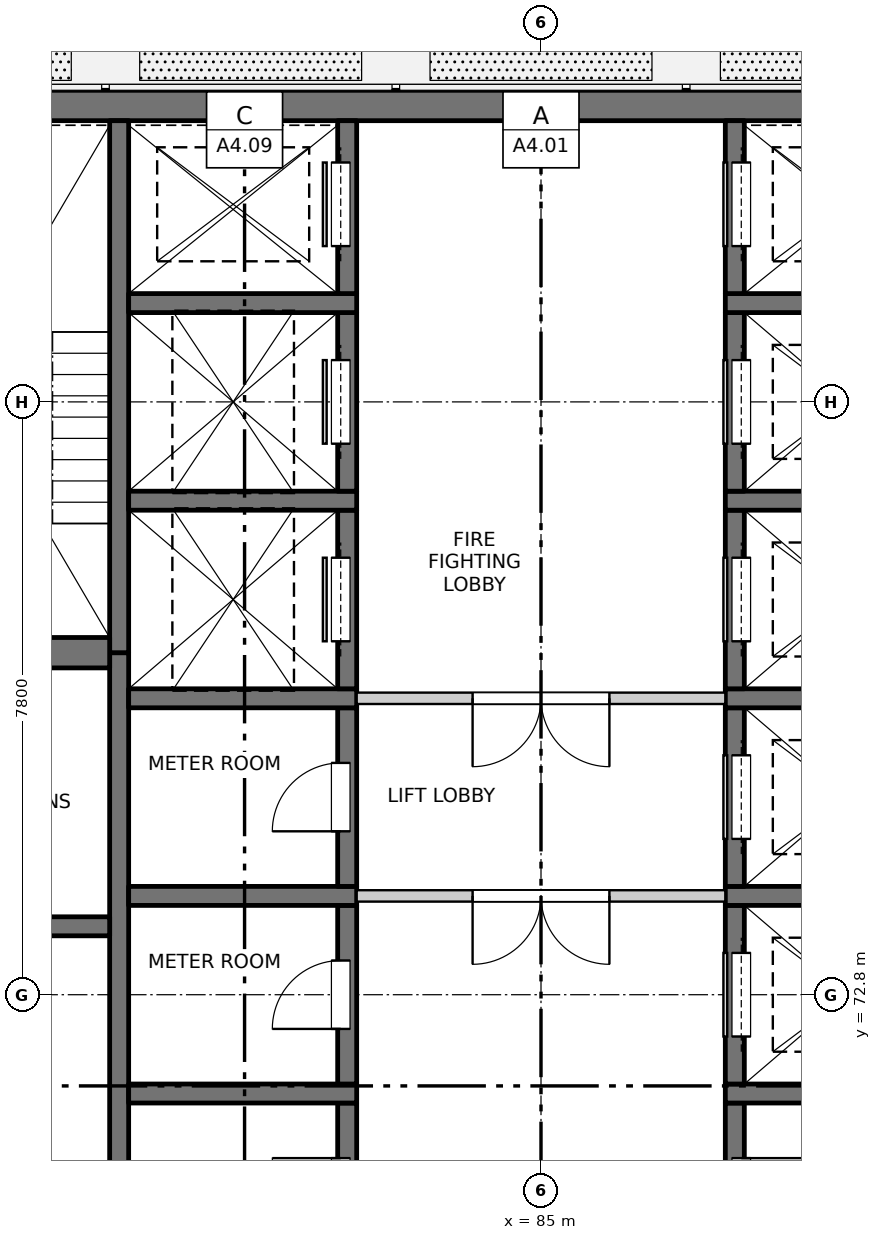
"""IFC4 building model, lengths in metres.
Left out: names, types, materials, properties, quantities, classifications, styles, units other than length and angle.
Written with IfcOpenShell. Run it as: python <this file> out.ifc"""

import sys

from ifc_helpers import new_model, si_unit, direction, frame, frame_2d, origin, place, context, subcontext, project, spatial, rectangle, extrude, element, fill, save


model = new_model("IFC4")
c1 = context("Model", 3, precision=1e-05, world=origin(), true_north=direction((0.0, 1.0)))
c2 = subcontext(c1, "Body", "Model", "MODEL_VIEW")
j1 = project(units=[si_unit("LENGTHUNIT", "METRE"), si_unit("PLANEANGLEUNIT", "RADIAN")], contexts=[c1])
p1 = place(None, origin())
s1 = spatial("IfcSite", under=j1, at=p1, CompositionType="ELEMENT")
p2 = place(p1, origin())
s2 = spatial("IfcBuilding", under=s1, at=p2, CompositionType="ELEMENT")
p3 = place(p2, frame((0.0, 0.0, 246.0)))
s3 = spatial("IfcBuildingStorey", under=s2, at=p3, CompositionType="ELEMENT", Elevation=246.0)
p4 = place(p3, frame((75.45, 84.5, -0.3), z_axis=(0.0, 0.0, 1.0), x_axis=(1.0, 0.0, 0.0)))
e1 = element("IfcWall", 1, at=p4, inside=s3, PredefinedType="SOLIDWALL", context=c2, shape_type="SweptSolid", body=[
    extrude(rectangle(XDim=19.1, YDim=0.4, at=frame_2d((9.55, 0.0))), origin(), (0.0, 0.0, 1.0), 3.45),
])
p5 = place(p3, frame((79.45, 60.975, -0.3), z_axis=(0.0, 0.0, 1.0), x_axis=(0.0, 1.0, 0.0)))
e2 = element("IfcWall", 2, at=p5, inside=s3, PredefinedType="SOLIDWALL", context=c2, shape_type="SweptSolid", body=[
    extrude(rectangle(XDim=16.325, YDim=0.25, at=frame_2d((8.163, 0.0))), origin(), (0.0, 0.0, 1.0), 3.45),
])
p6 = place(p3, frame((79.45, 77.3, -0.3), z_axis=(0.0, 0.0, 1.0), x_axis=(0.0, 1.0, 0.0)))
e3 = element("IfcWall", 3, at=p6, inside=s3, PredefinedType="SOLIDWALL", context=c2, shape_type="SweptSolid", body=[
    extrude(rectangle(XDim=7.0, YDim=0.25, at=frame_2d((3.5, 0.0))), origin(), (0.0, 0.0, 1.0), 3.45),
])
p7 = place(p3, frame((82.45, 69.025, -0.3), z_axis=(0.0, 0.0, 1.0), x_axis=(0.0, 1.0, 0.0)))
e4 = element("IfcWall", 4, at=p7, inside=s3, PredefinedType="SOLIDWALL", context=c2, shape_type="SweptSolid", body=[
    extrude(rectangle(XDim=2.35, YDim=0.25, at=frame_2d((1.175, 0.0))), origin(), (0.0, 0.0, 1.0), 3.45),
])
p8 = place(p7, frame((0.725, 0.0, 0.3)))
e5 = element("IfcOpeningElement", 5, at=p8, cuts=e4, PredefinedType="OPENING", context=c2, shape_type="SweptSolid", body=[
    extrude(rectangle(XDim=0.9, YDim=2.1, at=frame_2d((0.45, 1.05))), frame((0.0, 0.135, 0.0), z_axis=(0.0, -1.0, 0.0), x_axis=(1.0, 0.0, 0.0)), (0.0, 0.0, 1.0), 0.27),
])
p9 = place(p3, frame((79.575, 71.5, -0.3), z_axis=(0.0, 0.0, 1.0), x_axis=(1.0, 0.0, 0.0)))
e6 = element("IfcWall", 6, at=p9, inside=s3, PredefinedType="SOLIDWALL", context=c2, shape_type="SweptSolid", body=[
    extrude(rectangle(XDim=3.0, YDim=0.25, at=frame_2d((1.5, 0.0))), origin(), (0.0, 0.0, 1.0), 3.45),
])
p10 = place(p3, frame((82.45, 71.625, -0.3), z_axis=(0.0, 0.0, 1.0), x_axis=(0.0, 1.0, 0.0)))
e7 = element("IfcWall", 7, at=p10, inside=s3, PredefinedType="SOLIDWALL", context=c2, shape_type="SweptSolid", body=[
    extrude(rectangle(XDim=2.35, YDim=0.25, at=frame_2d((1.175, 0.0))), origin(), (0.0, 0.0, 1.0), 3.45),
])
p11 = place(p10, frame((0.725, 0.0, 0.3)))
e8 = element("IfcOpeningElement", 8, at=p11, cuts=e7, PredefinedType="OPENING", context=c2, shape_type="SweptSolid", body=[
    extrude(rectangle(XDim=0.9, YDim=2.1, at=frame_2d((0.45, 1.05))), frame((0.0, 0.135, 0.0), z_axis=(0.0, -1.0, 0.0), x_axis=(1.0, 0.0, 0.0)), (0.0, 0.0, 1.0), 0.27),
])
p12 = place(p3, frame((79.575, 74.1, -0.3), z_axis=(0.0, 0.0, 1.0), x_axis=(1.0, 0.0, 0.0)))
e9 = element("IfcWall", 9, at=p12, inside=s3, PredefinedType="SOLIDWALL", context=c2, shape_type="SweptSolid", body=[
    extrude(rectangle(XDim=3.0, YDim=0.25, at=frame_2d((1.5, 0.0))), origin(), (0.0, 0.0, 1.0), 3.45),
])
p13 = place(p3, frame((82.45, 74.225, -0.3), z_axis=(0.0, 0.0, 1.0), x_axis=(0.0, 1.0, 0.0)))
e10 = element("IfcWall", 10, at=p13, inside=s3, PredefinedType="SOLIDWALL", context=c2, shape_type="SweptSolid", body=[
    extrude(rectangle(XDim=2.35, YDim=0.25, at=frame_2d((1.175, 0.0))), origin(), (0.0, 0.0, 1.0), 3.45),
])
p14 = place(p13, frame((0.725, 0.0, 0.3)))
e11 = element("IfcOpeningElement", 11, at=p14, cuts=e10, PredefinedType="OPENING", context=c2, shape_type="SweptSolid", body=[
    extrude(rectangle(XDim=0.9, YDim=2.1, at=frame_2d((0.45, 1.05))), frame((0.0, 0.135, 0.0), z_axis=(0.0, -1.0, 0.0), x_axis=(1.0, 0.0, 0.0)), (0.0, 0.0, 1.0), 0.27),
])
p15 = place(p3, frame((79.575, 76.7, -0.3), z_axis=(0.0, 0.0, 1.0), x_axis=(1.0, 0.0, 0.0)))
e12 = element("IfcWall", 12, at=p15, inside=s3, PredefinedType="SOLIDWALL", context=c2, shape_type="SweptSolid", body=[
    extrude(rectangle(XDim=3.0, YDim=0.25, at=frame_2d((1.5, 0.0))), origin(), (0.0, 0.0, 1.0), 3.45),
])
p16 = place(p3, frame((82.45, 76.825, -0.3), z_axis=(0.0, 0.0, 1.0), x_axis=(0.0, 1.0, 0.0)))
e13 = element("IfcWall", 13, at=p16, inside=s3, PredefinedType="SOLIDWALL", context=c2, shape_type="SweptSolid", body=[
    extrude(rectangle(XDim=2.35, YDim=0.25, at=frame_2d((1.175, 0.0))), origin(), (0.0, 0.0, 1.0), 3.45),
])
p17 = place(p16, frame((0.625, 0.0, 0.3)))
e14 = element("IfcOpeningElement", 14, at=p17, cuts=e13, PredefinedType="OPENING", context=c2, shape_type="SweptSolid", body=[
    extrude(rectangle(XDim=1.1, YDim=2.1, at=frame_2d((0.55, 1.05))), frame((0.0, 0.135, 0.0), z_axis=(0.0, -1.0, 0.0), x_axis=(1.0, 0.0, 0.0)), (0.0, 0.0, 1.0), 0.27),
])
p18 = place(p3, frame((79.575, 79.3, -0.3), z_axis=(0.0, 0.0, 1.0), x_axis=(1.0, 0.0, 0.0)))
e15 = element("IfcWall", 15, at=p18, inside=s3, PredefinedType="SOLIDWALL", context=c2, shape_type="SweptSolid", body=[
    extrude(rectangle(XDim=3.0, YDim=0.25, at=frame_2d((1.5, 0.0))), origin(), (0.0, 0.0, 1.0), 3.45),
])
p19 = place(p3, frame((82.45, 79.425, -0.3), z_axis=(0.0, 0.0, 1.0), x_axis=(0.0, 1.0, 0.0)))
e16 = element("IfcWall", 16, at=p19, inside=s3, PredefinedType="SOLIDWALL", context=c2, shape_type="SweptSolid", body=[
    extrude(rectangle(XDim=2.35, YDim=0.25, at=frame_2d((1.175, 0.0))), origin(), (0.0, 0.0, 1.0), 3.45),
])
p20 = place(p19, frame((0.625, 0.0, 0.3)))
e17 = element("IfcOpeningElement", 17, at=p20, cuts=e16, PredefinedType="OPENING", context=c2, shape_type="SweptSolid", body=[
    extrude(rectangle(XDim=1.1, YDim=2.1, at=frame_2d((0.55, 1.05))), frame((0.0, 0.135, 0.0), z_axis=(0.0, -1.0, 0.0), x_axis=(1.0, 0.0, 0.0)), (0.0, 0.0, 1.0), 0.27),
])
p21 = place(p3, frame((79.575, 81.9, -0.3), z_axis=(0.0, 0.0, 1.0), x_axis=(1.0, 0.0, 0.0)))
e18 = element("IfcWall", 18, at=p21, inside=s3, PredefinedType="SOLIDWALL", context=c2, shape_type="SweptSolid", body=[
    extrude(rectangle(XDim=3.0, YDim=0.25, at=frame_2d((1.5, 0.0))), origin(), (0.0, 0.0, 1.0), 3.45),
])
p22 = place(p3, frame((82.45, 82.025, -0.3), z_axis=(0.0, 0.0, 1.0), x_axis=(0.0, 1.0, 0.0)))
e19 = element("IfcWall", 19, at=p22, inside=s3, PredefinedType="SOLIDWALL", context=c2, shape_type="SweptSolid", body=[
    extrude(rectangle(XDim=2.275, YDim=0.25, at=frame_2d((1.138, 0.0))), origin(), (0.0, 0.0, 1.0), 3.45),
])
p23 = place(p22, frame((0.625, 0.0, 0.3)))
e20 = element("IfcOpeningElement", 20, at=p23, cuts=e19, PredefinedType="OPENING", context=c2, shape_type="SweptSolid", body=[
    extrude(rectangle(XDim=1.1, YDim=2.1, at=frame_2d((0.55, 1.05))), frame((0.0, 0.135, 0.0), z_axis=(0.0, -1.0, 0.0), x_axis=(1.0, 0.0, 0.0)), (0.0, 0.0, 1.0), 0.27),
])
p24 = place(p3, frame((87.55, 69.025, -0.3), z_axis=(0.0, 0.0, 1.0), x_axis=(0.0, 1.0, 0.0)))
e21 = element("IfcWall", 21, at=p24, inside=s3, PredefinedType="SOLIDWALL", context=c2, shape_type="SweptSolid", body=[
    extrude(rectangle(XDim=2.35, YDim=0.25, at=frame_2d((1.175, 0.0))), origin(), (0.0, 0.0, 1.0), 3.45),
])
p25 = place(p24, frame((0.725, 0.0, 0.3)))
e22 = element("IfcOpeningElement", 22, at=p25, cuts=e21, PredefinedType="OPENING", context=c2, shape_type="SweptSolid", body=[
    extrude(rectangle(XDim=0.9, YDim=2.1, at=frame_2d((0.45, 1.05))), frame((0.0, 0.135, 0.0), z_axis=(0.0, -1.0, 0.0), x_axis=(1.0, 0.0, 0.0)), (0.0, 0.0, 1.0), 0.27),
])
p26 = place(p3, frame((87.425, 71.5, -0.3), z_axis=(0.0, 0.0, 1.0), x_axis=(1.0, 0.0, 0.0)))
e23 = element("IfcWall", 23, at=p26, inside=s3, PredefinedType="SOLIDWALL", context=c2, shape_type="SweptSolid", body=[
    extrude(rectangle(XDim=3.0, YDim=0.25, at=frame_2d((1.5, 0.0))), origin(), (0.0, 0.0, 1.0), 3.45),
])
p27 = place(p3, frame((87.55, 71.625, -0.3), z_axis=(0.0, 0.0, 1.0), x_axis=(0.0, 1.0, 0.0)))
e24 = element("IfcWall", 24, at=p27, inside=s3, PredefinedType="SOLIDWALL", context=c2, shape_type="SweptSolid", body=[
    extrude(rectangle(XDim=2.35, YDim=0.25, at=frame_2d((1.175, 0.0))), origin(), (0.0, 0.0, 1.0), 3.45),
])
p28 = place(p27, frame((0.625, 0.0, 0.3)))
e25 = element("IfcOpeningElement", 25, at=p28, cuts=e24, PredefinedType="OPENING", context=c2, shape_type="SweptSolid", body=[
    extrude(rectangle(XDim=1.1, YDim=2.1, at=frame_2d((0.55, 1.05))), frame((0.0, 0.135, 0.0), z_axis=(0.0, -1.0, 0.0), x_axis=(1.0, 0.0, 0.0)), (0.0, 0.0, 1.0), 0.27),
])
p29 = place(p3, frame((87.425, 74.1, -0.3), z_axis=(0.0, 0.0, 1.0), x_axis=(1.0, 0.0, 0.0)))
e26 = element("IfcWall", 26, at=p29, inside=s3, PredefinedType="SOLIDWALL", context=c2, shape_type="SweptSolid", body=[
    extrude(rectangle(XDim=3.0, YDim=0.25, at=frame_2d((1.5, 0.0))), origin(), (0.0, 0.0, 1.0), 3.45),
])
p30 = place(p3, frame((87.55, 74.225, -0.3), z_axis=(0.0, 0.0, 1.0), x_axis=(0.0, 1.0, 0.0)))
e27 = element("IfcWall", 27, at=p30, inside=s3, PredefinedType="SOLIDWALL", context=c2, shape_type="SweptSolid", body=[
    extrude(rectangle(XDim=2.35, YDim=0.25, at=frame_2d((1.175, 0.0))), origin(), (0.0, 0.0, 1.0), 3.45),
])
p31 = place(p30, frame((0.625, 0.0, 0.3)))
e28 = element("IfcOpeningElement", 28, at=p31, cuts=e27, PredefinedType="OPENING", context=c2, shape_type="SweptSolid", body=[
    extrude(rectangle(XDim=1.1, YDim=2.1, at=frame_2d((0.55, 1.05))), frame((0.0, 0.135, 0.0), z_axis=(0.0, -1.0, 0.0), x_axis=(1.0, 0.0, 0.0)), (0.0, 0.0, 1.0), 0.27),
])
p32 = place(p3, frame((87.425, 76.7, -0.3), z_axis=(0.0, 0.0, 1.0), x_axis=(1.0, 0.0, 0.0)))
e29 = element("IfcWall", 29, at=p32, inside=s3, PredefinedType="SOLIDWALL", context=c2, shape_type="SweptSolid", body=[
    extrude(rectangle(XDim=3.0, YDim=0.25, at=frame_2d((1.5, 0.0))), origin(), (0.0, 0.0, 1.0), 3.45),
])
p33 = place(p3, frame((87.55, 76.825, -0.3), z_axis=(0.0, 0.0, 1.0), x_axis=(0.0, 1.0, 0.0)))
e30 = element("IfcWall", 30, at=p33, inside=s3, PredefinedType="SOLIDWALL", context=c2, shape_type="SweptSolid", body=[
    extrude(rectangle(XDim=2.35, YDim=0.25, at=frame_2d((1.175, 0.0))), origin(), (0.0, 0.0, 1.0), 3.45),
])
p34 = place(p33, frame((0.625, 0.0, 0.3)))
e31 = element("IfcOpeningElement", 31, at=p34, cuts=e30, PredefinedType="OPENING", context=c2, shape_type="SweptSolid", body=[
    extrude(rectangle(XDim=1.1, YDim=2.1, at=frame_2d((0.55, 1.05))), frame((0.0, 0.135, 0.0), z_axis=(0.0, -1.0, 0.0), x_axis=(1.0, 0.0, 0.0)), (0.0, 0.0, 1.0), 0.27),
])
p35 = place(p3, frame((87.425, 79.3, -0.3), z_axis=(0.0, 0.0, 1.0), x_axis=(1.0, 0.0, 0.0)))
e32 = element("IfcWall", 32, at=p35, inside=s3, PredefinedType="SOLIDWALL", context=c2, shape_type="SweptSolid", body=[
    extrude(rectangle(XDim=3.0, YDim=0.25, at=frame_2d((1.5, 0.0))), origin(), (0.0, 0.0, 1.0), 3.45),
])
p36 = place(p3, frame((87.55, 79.425, -0.3), z_axis=(0.0, 0.0, 1.0), x_axis=(0.0, 1.0, 0.0)))
e33 = element("IfcWall", 33, at=p36, inside=s3, PredefinedType="SOLIDWALL", context=c2, shape_type="SweptSolid", body=[
    extrude(rectangle(XDim=2.35, YDim=0.25, at=frame_2d((1.175, 0.0))), origin(), (0.0, 0.0, 1.0), 3.45),
])
p37 = place(p36, frame((0.625, 0.0, 0.3)))
e34 = element("IfcOpeningElement", 34, at=p37, cuts=e33, PredefinedType="OPENING", context=c2, shape_type="SweptSolid", body=[
    extrude(rectangle(XDim=1.1, YDim=2.1, at=frame_2d((0.55, 1.05))), frame((0.0, 0.135, 0.0), z_axis=(0.0, -1.0, 0.0), x_axis=(1.0, 0.0, 0.0)), (0.0, 0.0, 1.0), 0.27),
])
p38 = place(p3, frame((87.425, 81.9, -0.3), z_axis=(0.0, 0.0, 1.0), x_axis=(1.0, 0.0, 0.0)))
e35 = element("IfcWall", 35, at=p38, inside=s3, PredefinedType="SOLIDWALL", context=c2, shape_type="SweptSolid", body=[
    extrude(rectangle(XDim=3.0, YDim=0.25, at=frame_2d((1.5, 0.0))), origin(), (0.0, 0.0, 1.0), 3.45),
])
p39 = place(p3, frame((87.55, 82.025, -0.3), z_axis=(0.0, 0.0, 1.0), x_axis=(0.0, 1.0, 0.0)))
e36 = element("IfcWall", 36, at=p39, inside=s3, PredefinedType="SOLIDWALL", context=c2, shape_type="SweptSolid", body=[
    extrude(rectangle(XDim=2.275, YDim=0.25, at=frame_2d((1.138, 0.0))), origin(), (0.0, 0.0, 1.0), 3.45),
])
p40 = place(p39, frame((0.625, 0.0, 0.3)))
e37 = element("IfcOpeningElement", 37, at=p40, cuts=e36, PredefinedType="OPENING", context=c2, shape_type="SweptSolid", body=[
    extrude(rectangle(XDim=1.1, YDim=2.1, at=frame_2d((0.55, 1.05))), frame((0.0, 0.135, 0.0), z_axis=(0.0, -1.0, 0.0), x_axis=(1.0, 0.0, 0.0)), (0.0, 0.0, 1.0), 0.27),
])
p41 = place(p3, frame((75.45, 73.7, -0.3), z_axis=(0.0, 0.0, 1.0), x_axis=(1.0, 0.0, 0.0)))
e38 = element("IfcWall", 38, at=p41, inside=s3, PredefinedType="SOLIDWALL", context=c2, shape_type="SweptSolid", body=[
    extrude(rectangle(XDim=3.875, YDim=0.25, at=frame_2d((1.938, 0.0))), origin(), (0.0, 0.0, 1.0), 3.45),
])
p42 = place(p3, frame((75.45, 77.3, -0.3), z_axis=(0.0, 0.0, 1.0), x_axis=(1.0, 0.0, 0.0)))
e39 = element("IfcWall", 39, at=p42, inside=s3, PredefinedType="SOLIDWALL", context=c2, shape_type="SweptSolid", body=[
    extrude(rectangle(XDim=3.875, YDim=0.4, at=frame_2d((1.938, 0.0))), origin(), (0.0, 0.0, 1.0), 3.45),
])
p43 = place(p3, frame((82.575, 74.1, 0.0), z_axis=(0.0, 0.0, 1.0), x_axis=(1.0, 0.0, 0.0)))
e40 = element("IfcWall", 40, at=p43, inside=s3, PredefinedType="PARTITIONING", context=c2, shape_type="SweptSolid", body=[
    extrude(rectangle(XDim=4.85, YDim=0.15, at=frame_2d((2.425, 0.0))), origin(), (0.0, 0.0, 1.0), 3.15),
])
p44 = place(p43, frame((1.525, 0.0, 0.0)))
e41 = element("IfcOpeningElement", 41, at=p44, cuts=e40, PredefinedType="OPENING", context=c2, shape_type="SweptSolid", body=[
    extrude(rectangle(XDim=1.8, YDim=2.1, at=frame_2d((0.9, 1.05))), frame((0.0, 0.085, 0.0), z_axis=(0.0, -1.0, 0.0), x_axis=(1.0, 0.0, 0.0)), (0.0, 0.0, 1.0), 0.17),
])
p45 = place(p3, frame((82.575, 76.7, 0.0), z_axis=(0.0, 0.0, 1.0), x_axis=(1.0, 0.0, 0.0)))
e42 = element("IfcWall", 42, at=p45, inside=s3, PredefinedType="PARTITIONING", context=c2, shape_type="SweptSolid", body=[
    extrude(rectangle(XDim=4.85, YDim=0.15, at=frame_2d((2.425, 0.0))), origin(), (0.0, 0.0, 1.0), 3.15),
])
p46 = place(p45, frame((1.525, 0.0, 0.0)))
e43 = element("IfcOpeningElement", 43, at=p46, cuts=e42, PredefinedType="OPENING", context=c2, shape_type="SweptSolid", body=[
    extrude(rectangle(XDim=1.8, YDim=2.1, at=frame_2d((0.9, 1.05))), frame((0.0, 0.085, 0.0), z_axis=(0.0, -1.0, 0.0), x_axis=(1.0, 0.0, 0.0)), (0.0, 0.0, 1.0), 0.17),
])
p47 = place(p8, origin())
e44 = element("IfcDoor", 44, at=p47, inside=s3, OperationType="SINGLE_SWING_RIGHT", PredefinedType="DOOR", context=c2, shape_type="SweptSolid", body=[
    extrude(rectangle(XDim=0.9, YDim=2.1, at=frame_2d((0.45, 1.05))), frame((0.0, 0.11, 0.0), z_axis=(0.0, -1.0, 0.0), x_axis=(1.0, 0.0, 0.0)), (0.0, 0.0, 1.0), 0.05),
])
fill(e5, e44)
p48 = place(p25, origin())
e45 = element("IfcDoor", 45, at=p48, inside=s3, OperationType="SINGLE_SWING_LEFT", PredefinedType="DOOR", context=c2, shape_type="SweptSolid", body=[
    extrude(rectangle(XDim=0.9, YDim=2.1, at=frame_2d((0.45, 1.05))), frame((0.0, -0.06, 0.0), z_axis=(0.0, -1.0, 0.0), x_axis=(1.0, 0.0, 0.0)), (0.0, 0.0, 1.0), 0.05),
])
fill(e22, e45)
p49 = place(p11, origin())
e46 = element("IfcDoor", 46, at=p49, inside=s3, OperationType="SINGLE_SWING_LEFT", PredefinedType="DOOR", context=c2, shape_type="SweptSolid", body=[
    extrude(rectangle(XDim=0.9, YDim=2.1, at=frame_2d((0.45, 1.05))), frame((0.0, 0.11, 0.0), z_axis=(0.0, -1.0, 0.0), x_axis=(1.0, 0.0, 0.0)), (0.0, 0.0, 1.0), 0.05),
])
fill(e8, e46)
p50 = place(p28, origin())
e47 = element("IfcDoor", 47, at=p50, inside=s3, OperationType="SLIDING_TO_LEFT", PredefinedType="DOOR", context=c2, shape_type="SweptSolid", body=[
    extrude(rectangle(XDim=1.1, YDim=2.1, at=frame_2d((0.55, 1.05))), frame((0.0, -0.06, 0.0), z_axis=(0.0, -1.0, 0.0), x_axis=(1.0, 0.0, 0.0)), (0.0, 0.0, 1.0), 0.05),
])
fill(e25, e47)
p51 = place(p44, origin())
e48 = element("IfcDoor", 48, at=p51, inside=s3, OperationType="DOUBLE_DOOR_SINGLE_SWING", PredefinedType="DOOR", context=c2, shape_type="SweptSolid", body=[
    extrude(rectangle(XDim=1.8, YDim=2.1, at=frame_2d((0.9, 1.05))), frame((0.0, 0.025, 0.0), z_axis=(0.0, -1.0, 0.0), x_axis=(1.0, 0.0, 0.0)), (0.0, 0.0, 1.0), 0.05),
])
fill(e41, e48)
p52 = place(p14, origin())
e49 = element("IfcDoor", 49, at=p52, inside=s3, OperationType="SINGLE_SWING_LEFT", PredefinedType="DOOR", context=c2, shape_type="SweptSolid", body=[
    extrude(rectangle(XDim=0.9, YDim=2.1, at=frame_2d((0.45, 1.05))), frame((0.0, 0.11, 0.0), z_axis=(0.0, -1.0, 0.0), x_axis=(1.0, 0.0, 0.0)), (0.0, 0.0, 1.0), 0.05),
])
fill(e11, e49)
p53 = place(p31, origin())
e50 = element("IfcDoor", 50, at=p53, inside=s3, OperationType="SLIDING_TO_LEFT", PredefinedType="DOOR", context=c2, shape_type="SweptSolid", body=[
    extrude(rectangle(XDim=1.1, YDim=2.1, at=frame_2d((0.55, 1.05))), frame((0.0, -0.06, 0.0), z_axis=(0.0, -1.0, 0.0), x_axis=(1.0, 0.0, 0.0)), (0.0, 0.0, 1.0), 0.05),
])
fill(e28, e50)
p54 = place(p46, origin())
e51 = element("IfcDoor", 51, at=p54, inside=s3, OperationType="DOUBLE_DOOR_SINGLE_SWING", PredefinedType="DOOR", context=c2, shape_type="SweptSolid", body=[
    extrude(rectangle(XDim=1.8, YDim=2.1, at=frame_2d((0.9, 1.05))), frame((0.0, 0.025, 0.0), z_axis=(0.0, -1.0, 0.0), x_axis=(1.0, 0.0, 0.0)), (0.0, 0.0, 1.0), 0.05),
])
fill(e43, e51)
p55 = place(p17, origin())
e52 = element("IfcDoor", 52, at=p55, inside=s3, OperationType="SLIDING_TO_LEFT", PredefinedType="DOOR", context=c2, shape_type="SweptSolid", body=[
    extrude(rectangle(XDim=1.1, YDim=2.1, at=frame_2d((0.55, 1.05))), frame((0.0, 0.11, 0.0), z_axis=(0.0, -1.0, 0.0), x_axis=(1.0, 0.0, 0.0)), (0.0, 0.0, 1.0), 0.05),
])
fill(e14, e52)
p56 = place(p34, origin())
e53 = element("IfcDoor", 53, at=p56, inside=s3, OperationType="SLIDING_TO_LEFT", PredefinedType="DOOR", context=c2, shape_type="SweptSolid", body=[
    extrude(rectangle(XDim=1.1, YDim=2.1, at=frame_2d((0.55, 1.05))), frame((0.0, -0.06, 0.0), z_axis=(0.0, -1.0, 0.0), x_axis=(1.0, 0.0, 0.0)), (0.0, 0.0, 1.0), 0.05),
])
fill(e31, e53)
p57 = place(p20, origin())
e54 = element("IfcDoor", 54, at=p57, inside=s3, OperationType="SLIDING_TO_LEFT", PredefinedType="DOOR", context=c2, shape_type="SweptSolid", body=[
    extrude(rectangle(XDim=1.1, YDim=2.1, at=frame_2d((0.55, 1.05))), frame((0.0, 0.11, 0.0), z_axis=(0.0, -1.0, 0.0), x_axis=(1.0, 0.0, 0.0)), (0.0, 0.0, 1.0), 0.05),
])
fill(e17, e54)
p58 = place(p37, origin())
e55 = element("IfcDoor", 55, at=p58, inside=s3, OperationType="SLIDING_TO_RIGHT", PredefinedType="DOOR", context=c2, shape_type="SweptSolid", body=[
    extrude(rectangle(XDim=1.1, YDim=2.1, at=frame_2d((0.55, 1.05))), frame((0.0, -0.06, 0.0), z_axis=(0.0, -1.0, 0.0), x_axis=(1.0, 0.0, 0.0)), (0.0, 0.0, 1.0), 0.05),
])
fill(e34, e55)
p59 = place(p23, origin())
e56 = element("IfcDoor", 56, at=p59, inside=s3, OperationType="SLIDING_TO_RIGHT", PredefinedType="DOOR", context=c2, shape_type="SweptSolid", body=[
    extrude(rectangle(XDim=1.1, YDim=2.1, at=frame_2d((0.55, 1.05))), frame((0.0, 0.11, 0.0), z_axis=(0.0, -1.0, 0.0), x_axis=(1.0, 0.0, 0.0)), (0.0, 0.0, 1.0), 0.05),
])
fill(e20, e56)
p60 = place(p40, origin())
e57 = element("IfcDoor", 57, at=p60, inside=s3, OperationType="SLIDING_TO_RIGHT", PredefinedType="DOOR", context=c2, shape_type="SweptSolid", body=[
    extrude(rectangle(XDim=1.1, YDim=2.1, at=frame_2d((0.55, 1.05))), frame((0.0, -0.06, 0.0), z_axis=(0.0, -1.0, 0.0), x_axis=(1.0, 0.0, 0.0)), (0.0, 0.0, 1.0), 0.05),
])
fill(e37, e57)
save(model, sys.argv[1])
